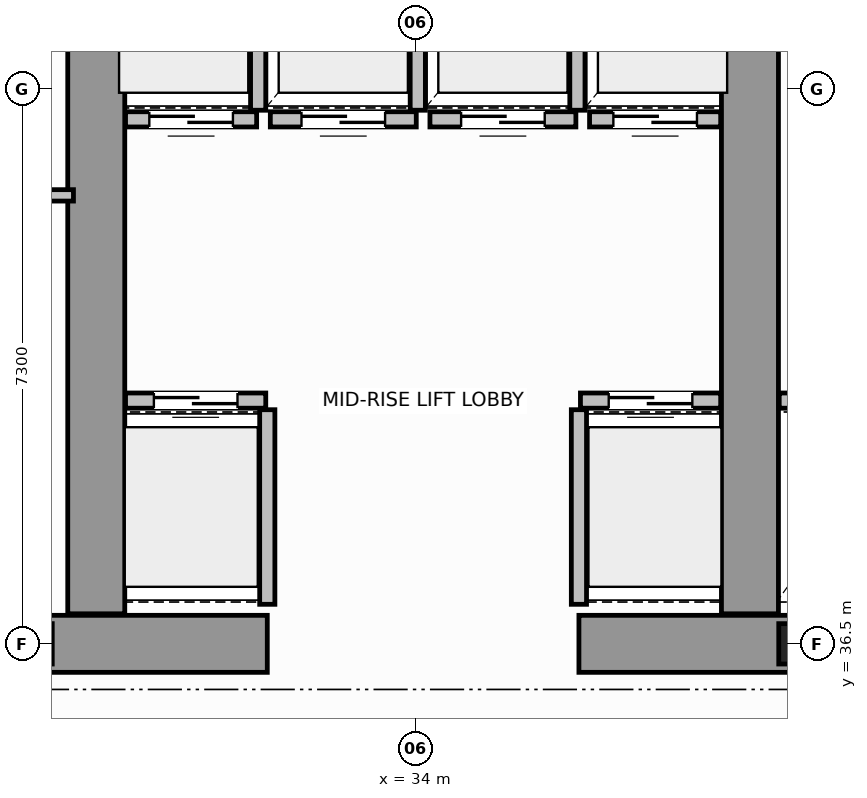
"""IFC4 building model, lengths in metres.
Left out: names, types, materials, properties, quantities, classifications, styles, units other than length and angle.
Written with IfcOpenShell. Run it as: python <this file> out.ifc"""

import sys

from ifc_helpers import new_model, si_unit, direction, frame, frame_2d, origin, origin_2d, place, context, subcontext, project, spatial, rectangle, i_section, extrude, source, transform, mapped, element, fill, save


model = new_model("IFC4")
c1 = context("Model", 3, precision=1e-05, world=origin(), true_north=direction((0.0, 1.0)))
c2 = subcontext(c1, "Body", "Model", "MODEL_VIEW")
j1 = project(units=[si_unit("LENGTHUNIT", "METRE"), si_unit("PLANEANGLEUNIT", "RADIAN")], contexts=[c1])
p1 = place(None, origin())
s1 = spatial("IfcSite", under=j1, at=p1, CompositionType="ELEMENT")
p2 = place(p1, origin())
s2 = spatial("IfcBuilding", under=s1, at=p2, CompositionType="ELEMENT")
p3 = place(p2, frame((0.0, 0.0, 126.2)))
s3 = spatial("IfcBuildingStorey", under=s2, at=p3, CompositionType="ELEMENT", Elevation=126.2)
m1 = source(origin(), c2, "Body", "SweptSolid", [
    extrude(i_section(OverallWidth=0.442, OverallDepth=0.531, WebThickness=0.065, FlangeThickness=0.076, FilletRadius=0.015, at=origin_2d()), origin(), (0.0, 0.0, 1.0), 3.8),
])
p4 = place(p3, frame((39.0, 36.5, 0.0), z_axis=(0.0, 0.0, 1.0), x_axis=(1.0, 0.0, 0.0)))
e1 = element("IfcColumn", 1, at=p4, inside=s3, PredefinedType="COLUMN", context=c2, shape_type="MappedRepresentation", body=[
    mapped(m1, transform((0.0, 0.0, 0.0), scale=1.0)),
])
for number, where, z_axis, x_axis in (
    (2, (27.55, 36.5, 0.0), (0.0, 0.0, 1.0), (1.0, 0.0, 0.0)),
    (3, (36.15, 36.5, 0.0), (0.0, 0.0, 1.0), (1.0, 0.0, 0.0)),
):
    element("IfcWall", number, at=place(p3, frame(where, z_axis=z_axis, x_axis=x_axis)), inside=s3, PredefinedType="SHEAR", context=c2, shape_type="SweptSolid", body=[
        extrude(rectangle(XDim=4.5, YDim=0.75, at=frame_2d((2.25, 0.0))), origin(), (0.0, 0.0, 1.0), 3.8),
    ])
for number, where, z_axis, x_axis in (
    (4, (29.8, 36.895, 0.0), (0.0, 0.0, 1.0), (0.0, 1.0, 0.0)),
    (5, (38.4, 36.895, 0.0), (0.0, 0.0, 1.0), (0.0, 1.0, 0.0)),
):
    element("IfcWall", number, at=place(p3, frame(where, z_axis=z_axis, x_axis=x_axis)), inside=s3, PredefinedType="SHEAR", context=c2, shape_type="SweptSolid", body=[
        extrude(rectangle(XDim=9.305, YDim=0.75, at=frame_2d((4.652, 0.0))), origin(), (0.0, 0.0, 1.0), 3.8),
    ])
p5 = place(p3, frame((30.185, 39.7, 0.0), z_axis=(0.0, 0.0, 1.0), x_axis=(1.0, 0.0, 0.0)))
e6 = element("IfcWall", 6, at=p5, inside=s3, PredefinedType="SOLIDWALL", context=c2, shape_type="SweptSolid", body=[
    extrude(rectangle(XDim=1.845, YDim=0.2, at=frame_2d((0.922, 0.0))), origin(), (0.0, 0.0, 1.0), 3.58),
])
p6 = place(p5, frame((0.373, 0.0, 0.0)))
e7 = element("IfcOpeningElement", 7, at=p6, cuts=e6, PredefinedType="OPENING", context=c2, shape_type="SweptSolid", body=[
    extrude(rectangle(XDim=1.1, YDim=2.15, at=frame_2d((0.55, 1.075))), frame((0.0, 0.11, 0.0), z_axis=(0.0, -1.0, 0.0), x_axis=(1.0, 0.0, 0.0)), (0.0, 0.0, 1.0), 0.22),
])
p7 = place(p3, frame((32.05, 37.02, 0.0), z_axis=(0.0, 0.0, 1.0), x_axis=(0.0, 1.0, 0.0)))
e8 = element("IfcWall", 8, at=p7, inside=s3, PredefinedType="SOLIDWALL", context=c2, shape_type="SweptSolid", body=[
    extrude(rectangle(XDim=2.56, YDim=0.2, at=frame_2d((1.28, 0.0))), origin(), (0.0, 0.0, 1.0), 3.58),
])
p8 = place(p3, frame((36.17, 39.7, 0.0), z_axis=(0.0, 0.0, 1.0), x_axis=(1.0, 0.0, 0.0)))
e9 = element("IfcWall", 9, at=p8, inside=s3, PredefinedType="SOLIDWALL", context=c2, shape_type="SweptSolid", body=[
    extrude(rectangle(XDim=1.845, YDim=0.2, at=frame_2d((0.922, 0.0))), origin(), (0.0, 0.0, 1.0), 3.58),
])
p9 = place(p8, frame((0.372, 0.0, 0.0)))
e10 = element("IfcOpeningElement", 10, at=p9, cuts=e9, PredefinedType="OPENING", context=c2, shape_type="SweptSolid", body=[
    extrude(rectangle(XDim=1.1, YDim=2.15, at=frame_2d((0.55, 1.075))), frame((0.0, 0.11, 0.0), z_axis=(0.0, -1.0, 0.0), x_axis=(1.0, 0.0, 0.0)), (0.0, 0.0, 1.0), 0.22),
])
p10 = place(p3, frame((36.15, 37.02, 0.0), z_axis=(0.0, 0.0, 1.0), x_axis=(0.0, 1.0, 0.0)))
e11 = element("IfcWall", 11, at=p10, inside=s3, PredefinedType="SOLIDWALL", context=c2, shape_type="SweptSolid", body=[
    extrude(rectangle(XDim=2.56, YDim=0.2, at=frame_2d((1.28, 0.0))), origin(), (0.0, 0.0, 1.0), 3.58),
])
p11 = place(p3, frame((30.185, 43.4, 0.0), z_axis=(0.0, 0.0, 1.0), x_axis=(1.0, 0.0, 0.0)))
e12 = element("IfcWall", 12, at=p11, inside=s3, PredefinedType="SOLIDWALL", context=c2, shape_type="SweptSolid", body=[
    extrude(rectangle(XDim=1.725, YDim=0.2, at=frame_2d((0.862, 0.0))), origin(), (0.0, 0.0, 1.0), 3.58),
])
p12 = place(p11, frame((0.313, 0.0, 0.0)))
e13 = element("IfcOpeningElement", 13, at=p12, cuts=e12, PredefinedType="OPENING", context=c2, shape_type="SweptSolid", body=[
    extrude(rectangle(XDim=1.1, YDim=2.15, at=frame_2d((0.55, 1.075))), frame((0.0, 0.11, 0.0), z_axis=(0.0, -1.0, 0.0), x_axis=(1.0, 0.0, 0.0)), (0.0, 0.0, 1.0), 0.22),
])
p13 = place(p3, frame((31.93, 43.52, 0.0), z_axis=(0.0, 0.0, 1.0), x_axis=(0.0, 1.0, 0.0)))
e14 = element("IfcWall", 14, at=p13, inside=s3, PredefinedType="SOLIDWALL", context=c2, shape_type="SweptSolid", body=[
    extrude(rectangle(XDim=2.56, YDim=0.2, at=frame_2d((1.28, 0.0))), origin(), (0.0, 0.0, 1.0), 3.58),
])
p14 = place(p3, frame((32.09, 43.4, 0.0), z_axis=(0.0, 0.0, 1.0), x_axis=(1.0, 0.0, 0.0)))
e15 = element("IfcWall", 15, at=p14, inside=s3, PredefinedType="SOLIDWALL", context=c2, shape_type="SweptSolid", body=[
    extrude(rectangle(XDim=1.92, YDim=0.2, at=frame_2d((0.96, 0.0))), origin(), (0.0, 0.0, 1.0), 3.58),
])
p15 = place(p14, frame((0.41, 0.0, 0.0)))
e16 = element("IfcOpeningElement", 16, at=p15, cuts=e15, PredefinedType="OPENING", context=c2, shape_type="SweptSolid", body=[
    extrude(rectangle(XDim=1.1, YDim=2.15, at=frame_2d((0.55, 1.075))), frame((0.0, 0.11, 0.0), z_axis=(0.0, -1.0, 0.0), x_axis=(1.0, 0.0, 0.0)), (0.0, 0.0, 1.0), 0.22),
])
p16 = place(p3, frame((34.03, 43.52, 0.0), z_axis=(0.0, 0.0, 1.0), x_axis=(0.0, 1.0, 0.0)))
e17 = element("IfcWall", 17, at=p16, inside=s3, PredefinedType="SOLIDWALL", context=c2, shape_type="SweptSolid", body=[
    extrude(rectangle(XDim=2.56, YDim=0.2, at=frame_2d((1.28, 0.0))), origin(), (0.0, 0.0, 1.0), 3.58),
])
p17 = place(p3, frame((34.19, 43.4, 0.0), z_axis=(0.0, 0.0, 1.0), x_axis=(1.0, 0.0, 0.0)))
e18 = element("IfcWall", 18, at=p17, inside=s3, PredefinedType="SOLIDWALL", context=c2, shape_type="SweptSolid", body=[
    extrude(rectangle(XDim=1.92, YDim=0.2, at=frame_2d((0.96, 0.0))), origin(), (0.0, 0.0, 1.0), 3.58),
])
p18 = place(p17, frame((0.41, 0.0, 0.0)))
e19 = element("IfcOpeningElement", 19, at=p18, cuts=e18, PredefinedType="OPENING", context=c2, shape_type="SweptSolid", body=[
    extrude(rectangle(XDim=1.1, YDim=2.15, at=frame_2d((0.55, 1.075))), frame((0.0, 0.11, 0.0), z_axis=(0.0, -1.0, 0.0), x_axis=(1.0, 0.0, 0.0)), (0.0, 0.0, 1.0), 0.22),
])
p19 = place(p3, frame((36.13, 43.52, 0.0), z_axis=(0.0, 0.0, 1.0), x_axis=(0.0, 1.0, 0.0)))
e20 = element("IfcWall", 20, at=p19, inside=s3, PredefinedType="SOLIDWALL", context=c2, shape_type="SweptSolid", body=[
    extrude(rectangle(XDim=2.56, YDim=0.2, at=frame_2d((1.28, 0.0))), origin(), (0.0, 0.0, 1.0), 3.58),
])
p20 = place(p3, frame((36.29, 43.4, 0.0), z_axis=(0.0, 0.0, 1.0), x_axis=(1.0, 0.0, 0.0)))
e21 = element("IfcWall", 21, at=p20, inside=s3, PredefinedType="SOLIDWALL", context=c2, shape_type="SweptSolid", body=[
    extrude(rectangle(XDim=1.725, YDim=0.2, at=frame_2d((0.862, 0.0))), origin(), (0.0, 0.0, 1.0), 3.58),
])
p21 = place(p20, frame((0.313, 0.0, 0.0)))
e22 = element("IfcOpeningElement", 22, at=p21, cuts=e21, PredefinedType="OPENING", context=c2, shape_type="SweptSolid", body=[
    extrude(rectangle(XDim=1.1, YDim=2.15, at=frame_2d((0.55, 1.075))), frame((0.0, 0.11, 0.0), z_axis=(0.0, -1.0, 0.0), x_axis=(1.0, 0.0, 0.0)), (0.0, 0.0, 1.0), 0.22),
])
p22 = place(p3, frame((38.785, 39.7, 0.0), z_axis=(0.0, 0.0, 1.0), x_axis=(1.0, 0.0, 0.0)))
e23 = element("IfcWall", 23, at=p22, inside=s3, PredefinedType="SOLIDWALL", context=c2, shape_type="SweptSolid", body=[
    extrude(rectangle(XDim=1.845, YDim=0.2, at=frame_2d((0.922, 0.0))), origin(), (0.0, 0.0, 1.0), 3.58),
])
p23 = place(p3, frame((21.5, 42.4, 0.0), z_axis=(0.0, 0.0, 1.0), x_axis=(1.0, 0.0, 0.0)))
e24 = element("IfcWall", 24, at=p23, inside=s3, PredefinedType="PARTITIONING", context=c2, shape_type="SweptSolid", body=[
    extrude(rectangle(XDim=8.0, YDim=0.15, at=frame_2d((4.0, 0.0))), origin(), (0.0, 0.0, 1.0), 3.58),
])
p24 = place(p23, frame((3.4, 0.0, 0.0)))
e25 = element("IfcOpeningElement", 25, at=p24, cuts=e24, PredefinedType="OPENING", context=c2, shape_type="SweptSolid", body=[
    extrude(rectangle(XDim=0.9, YDim=2.1, at=frame_2d((0.45, 1.05))), frame((0.0, 0.085, 0.0), z_axis=(0.0, -1.0, 0.0), x_axis=(1.0, 0.0, 0.0)), (0.0, 0.0, 1.0), 0.17),
])
m2 = source(origin(), c2, "Body", "SweptSolid", [
    extrude(rectangle(XDim=1.1, YDim=2.15, at=frame_2d((0.55, 1.075))), frame((0.0, 0.025, 0.0), z_axis=(0.0, -1.0, 0.0), x_axis=(1.0, 0.0, 0.0)), (0.0, 0.0, 1.0), 0.05),
])
p25 = place(p6, origin())
e26 = element("IfcDoor", 26, at=p25, inside=s3, OperationType="DOUBLE_DOOR_SLIDING", PredefinedType="DOOR", context=c2, shape_type="MappedRepresentation", body=[
    mapped(m2, transform((0.0, 0.0, 0.0), scale=1.0)),
])
fill(e7, e26)
p26 = place(p9, origin())
e27 = element("IfcDoor", 27, at=p26, inside=s3, OperationType="DOUBLE_DOOR_SLIDING", PredefinedType="DOOR", context=c2, shape_type="MappedRepresentation", body=[
    mapped(m2, transform((0.0, 0.0, 0.0), scale=1.0)),
])
fill(e10, e27)
p27 = place(p12, origin())
e28 = element("IfcDoor", 28, at=p27, inside=s3, OperationType="DOUBLE_DOOR_SLIDING", PredefinedType="DOOR", context=c2, shape_type="MappedRepresentation", body=[
    mapped(m2, transform((0.0, 0.0, 0.0), scale=1.0)),
])
fill(e13, e28)
p28 = place(p15, origin())
e29 = element("IfcDoor", 29, at=p28, inside=s3, OperationType="DOUBLE_DOOR_SLIDING", PredefinedType="DOOR", context=c2, shape_type="MappedRepresentation", body=[
    mapped(m2, transform((0.0, 0.0, 0.0), scale=1.0)),
])
fill(e16, e29)
p29 = place(p18, origin())
e30 = element("IfcDoor", 30, at=p29, inside=s3, OperationType="DOUBLE_DOOR_SLIDING", PredefinedType="DOOR", context=c2, shape_type="MappedRepresentation", body=[
    mapped(m2, transform((0.0, 0.0, 0.0), scale=1.0)),
])
fill(e19, e30)
p30 = place(p21, origin())
e31 = element("IfcDoor", 31, at=p30, inside=s3, OperationType="DOUBLE_DOOR_SLIDING", PredefinedType="DOOR", context=c2, shape_type="MappedRepresentation", body=[
    mapped(m2, transform((0.0, 0.0, 0.0), scale=1.0)),
])
fill(e22, e31)
save(model, sys.argv[1])
